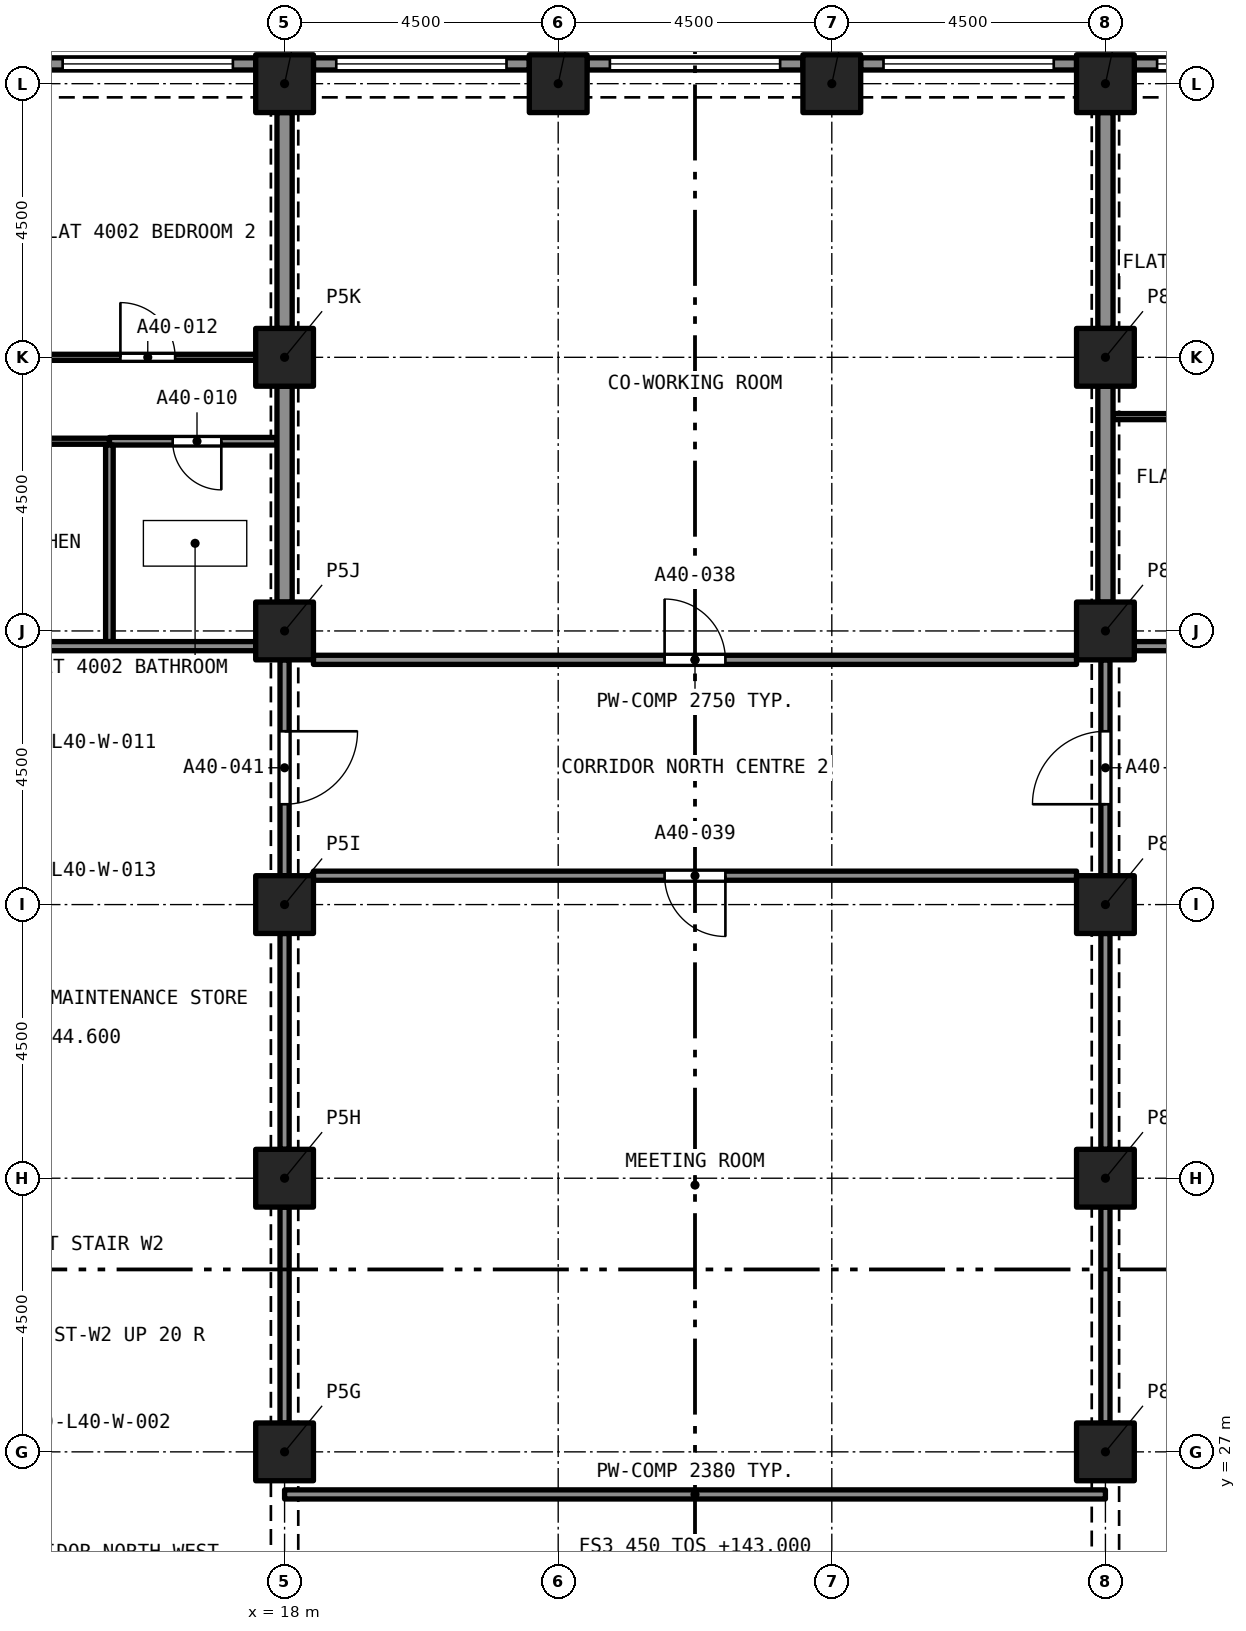
"""IFC4 building model, lengths in metres.
Left out: names, types, materials, properties, quantities, classifications, styles, units other than length and angle.
Written with IfcOpenShell. Run it as: python <this file> out.ifc"""

import sys

from ifc_helpers import new_model, si_unit, direction, frame, frame_2d, origin, origin_2d, place, context, subcontext, project, spatial, rectangle, extrude, element, fill, save


model = new_model("IFC4")
c1 = context("Model", 3, precision=1e-05, world=origin(), true_north=direction((0.0, 1.0)))
c2 = subcontext(c1, "Body", "Model", "MODEL_VIEW")
j1 = project(units=[si_unit("LENGTHUNIT", "METRE"), si_unit("PLANEANGLEUNIT", "RADIAN")], contexts=[c1])
p1 = place(None, origin())
s1 = spatial("IfcSite", under=j1, at=p1, CompositionType="ELEMENT")
p2 = place(p1, origin())
s2 = spatial("IfcBuilding", under=s1, at=p2, CompositionType="ELEMENT")
p3 = place(p2, frame((0.0, 0.0, 143.0)))
s3 = spatial("IfcBuildingStorey", under=s2, at=p3, CompositionType="ELEMENT", Elevation=143.0)
for number, where, z_axis, x_axis in (
    (1, (18.0, 27.0, 0.0), (0.0, 0.0, 1.0), (1.0, 0.0, 0.0)),
    (2, (31.5, 27.0, 0.0), (0.0, 0.0, 1.0), (1.0, 0.0, 0.0)),
    (3, (18.0, 31.5, 0.0), (0.0, 0.0, 1.0), (1.0, 0.0, 0.0)),
    (4, (31.5, 31.5, 0.0), (0.0, 0.0, 1.0), (1.0, 0.0, 0.0)),
    (5, (18.0, 36.0, 0.0), (0.0, 0.0, 1.0), (1.0, 0.0, 0.0)),
    (6, (31.5, 36.0, 0.0), (0.0, 0.0, 1.0), (1.0, 0.0, 0.0)),
    (7, (18.0, 40.5, 0.0), (0.0, 0.0, 1.0), (1.0, 0.0, 0.0)),
    (8, (31.5, 40.5, 0.0), (0.0, 0.0, 1.0), (1.0, 0.0, 0.0)),
    (9, (18.0, 45.0, 0.0), (0.0, 0.0, 1.0), (1.0, 0.0, 0.0)),
    (10, (31.5, 45.0, 0.0), (0.0, 0.0, 1.0), (1.0, 0.0, 0.0)),
    (11, (18.0, 49.5, 0.0), (0.0, 0.0, 1.0), (1.0, 0.0, 0.0)),
    (12, (22.5, 49.5, 0.0), (0.0, 0.0, 1.0), (1.0, 0.0, 0.0)),
    (13, (27.0, 49.5, 0.0), (0.0, 0.0, 1.0), (1.0, 0.0, 0.0)),
    (14, (31.5, 49.5, 0.0), (0.0, 0.0, 1.0), (1.0, 0.0, 0.0)),
):
    element("IfcColumn", number, at=place(p3, frame(where, z_axis=z_axis, x_axis=x_axis)), inside=s3, PredefinedType="COLUMN", context=c2, shape_type="SweptSolid", body=[
        extrude(rectangle(XDim=0.95, YDim=0.95, at=origin_2d()), origin(), (0.0, 0.0, 1.0), 3.2),
    ])
p4 = place(p3, frame((31.975, 49.825, 0.0), z_axis=(0.0, 0.0, 1.0), x_axis=(1.0, 0.0, 0.0)))
e15 = element("IfcWall", 15, at=p4, inside=s3, PredefinedType="SOLIDWALL", context=c2, shape_type="SweptSolid", body=[
    extrude(rectangle(XDim=3.55, YDim=0.2, at=frame_2d((1.775, 0.0))), origin(), (0.0, 0.0, 1.0), 3.2),
])
p5 = place(p4, frame((0.375, 0.0, 0.45)))
e16 = element("IfcOpeningElement", 16, at=p5, cuts=e15, PredefinedType="OPENING", context=c2, shape_type="SweptSolid", body=[
    extrude(rectangle(XDim=2.8, YDim=1.95, at=frame_2d((1.4, 0.975))), frame((0.0, 0.11, 0.0), z_axis=(0.0, -1.0, 0.0), x_axis=(1.0, 0.0, 0.0)), (0.0, 0.0, 1.0), 0.22),
])
p6 = place(p3, frame((27.475, 49.825, 0.0), z_axis=(0.0, 0.0, 1.0), x_axis=(1.0, 0.0, 0.0)))
e17 = element("IfcWall", 17, at=p6, inside=s3, PredefinedType="SOLIDWALL", context=c2, shape_type="SweptSolid", body=[
    extrude(rectangle(XDim=3.55, YDim=0.2, at=frame_2d((1.775, 0.0))), origin(), (0.0, 0.0, 1.0), 3.2),
])
p7 = place(p6, frame((0.375, 0.0, 0.45)))
e18 = element("IfcOpeningElement", 18, at=p7, cuts=e17, PredefinedType="OPENING", context=c2, shape_type="SweptSolid", body=[
    extrude(rectangle(XDim=2.8, YDim=1.95, at=frame_2d((1.4, 0.975))), frame((0.0, 0.11, 0.0), z_axis=(0.0, -1.0, 0.0), x_axis=(1.0, 0.0, 0.0)), (0.0, 0.0, 1.0), 0.22),
])
p8 = place(p3, frame((22.975, 49.825, 0.0), z_axis=(0.0, 0.0, 1.0), x_axis=(1.0, 0.0, 0.0)))
e19 = element("IfcWall", 19, at=p8, inside=s3, PredefinedType="SOLIDWALL", context=c2, shape_type="SweptSolid", body=[
    extrude(rectangle(XDim=3.55, YDim=0.2, at=frame_2d((1.775, 0.0))), origin(), (0.0, 0.0, 1.0), 3.2),
])
p9 = place(p8, frame((0.375, 0.0, 0.45)))
e20 = element("IfcOpeningElement", 20, at=p9, cuts=e19, PredefinedType="OPENING", context=c2, shape_type="SweptSolid", body=[
    extrude(rectangle(XDim=2.8, YDim=1.95, at=frame_2d((1.4, 0.975))), frame((0.0, 0.11, 0.0), z_axis=(0.0, -1.0, 0.0), x_axis=(1.0, 0.0, 0.0)), (0.0, 0.0, 1.0), 0.22),
])
p10 = place(p3, frame((18.475, 49.825, 0.0), z_axis=(0.0, 0.0, 1.0), x_axis=(1.0, 0.0, 0.0)))
e21 = element("IfcWall", 21, at=p10, inside=s3, PredefinedType="SOLIDWALL", context=c2, shape_type="SweptSolid", body=[
    extrude(rectangle(XDim=3.55, YDim=0.2, at=frame_2d((1.775, 0.0))), origin(), (0.0, 0.0, 1.0), 3.2),
])
p11 = place(p10, frame((0.375, 0.0, 0.45)))
e22 = element("IfcOpeningElement", 22, at=p11, cuts=e21, PredefinedType="OPENING", context=c2, shape_type="SweptSolid", body=[
    extrude(rectangle(XDim=2.8, YDim=1.95, at=frame_2d((1.4, 0.975))), frame((0.0, 0.11, 0.0), z_axis=(0.0, -1.0, 0.0), x_axis=(1.0, 0.0, 0.0)), (0.0, 0.0, 1.0), 0.22),
])
p12 = place(p3, frame((13.975, 49.825, 0.0), z_axis=(0.0, 0.0, 1.0), x_axis=(1.0, 0.0, 0.0)))
e23 = element("IfcWall", 23, at=p12, inside=s3, PredefinedType="SOLIDWALL", context=c2, shape_type="SweptSolid", body=[
    extrude(rectangle(XDim=3.55, YDim=0.2, at=frame_2d((1.775, 0.0))), origin(), (0.0, 0.0, 1.0), 3.2),
])
p13 = place(p12, frame((0.375, 0.0, 0.45)))
e24 = element("IfcOpeningElement", 24, at=p13, cuts=e23, PredefinedType="OPENING", context=c2, shape_type="SweptSolid", body=[
    extrude(rectangle(XDim=2.8, YDim=1.95, at=frame_2d((1.4, 0.975))), frame((0.0, 0.11, 0.0), z_axis=(0.0, -1.0, 0.0), x_axis=(1.0, 0.0, 0.0)), (0.0, 0.0, 1.0), 0.22),
])
p14 = place(p3, frame((17.875, 43.62, 0.0), z_axis=(0.0, 0.0, 1.0), x_axis=(-1.0, 0.0, 0.0)))
e25 = element("IfcWall", 25, at=p14, inside=s3, PredefinedType="PARTITIONING", context=c2, shape_type="SweptSolid", body=[
    extrude(rectangle(XDim=2.756, YDim=0.125, at=frame_2d((1.378, 0.0))), origin(), (0.0, 0.0, 1.0), 2.9),
])
p15 = place(p14, frame((0.915, 0.0, 0.0)))
e26 = element("IfcOpeningElement", 26, at=p15, cuts=e25, PredefinedType="OPENING", context=c2, shape_type="SweptSolid", body=[
    extrude(rectangle(XDim=0.8, YDim=2.1, at=frame_2d((0.4, 1.05))), frame((0.0, 0.073, 0.0), z_axis=(0.0, -1.0, 0.0), x_axis=(1.0, 0.0, 0.0)), (0.0, 0.0, 1.0), 0.145),
])
p16 = place(p3, frame((15.119, 40.325, 0.0), z_axis=(0.0, 0.0, 1.0), x_axis=(0.0, 1.0, 0.0)))
e27 = element("IfcWall", 27, at=p16, inside=s3, PredefinedType="PARTITIONING", context=c2, shape_type="SweptSolid", body=[
    extrude(rectangle(XDim=3.233, YDim=0.125, at=frame_2d((1.616, 0.0))), origin(), (0.0, 0.0, 1.0), 2.9),
])
p17 = place(p3, frame((18.0, 40.975, 0.0), z_axis=(0.0, 0.0, 1.0), x_axis=(0.0, 1.0, 0.0)))
e28 = element("IfcWall", 28, at=p17, inside=s3, PredefinedType="PARTITIONING", context=c2, shape_type="SweptSolid", body=[
    extrude(rectangle(XDim=3.55, YDim=0.25, at=frame_2d((1.775, 0.0))), origin(), (0.0, 0.0, 1.0), 2.38),
])
p18 = place(p3, frame((13.5, 45.0, 0.0), z_axis=(0.0, 0.0, 1.0), x_axis=(1.0, 0.0, 0.0)))
e29 = element("IfcWall", 29, at=p18, inside=s3, PredefinedType="PARTITIONING", context=c2, shape_type="SweptSolid", body=[
    extrude(rectangle(XDim=4.025, YDim=0.1, at=frame_2d((2.012, 0.0))), origin(), (0.0, 0.0, 1.0), 2.9),
])
p19 = place(p18, frame((1.8, 0.0, 0.0)))
e30 = element("IfcOpeningElement", 30, at=p19, cuts=e29, PredefinedType="OPENING", context=c2, shape_type="SweptSolid", body=[
    extrude(rectangle(XDim=0.9, YDim=2.1, at=frame_2d((0.45, 1.05))), frame((0.0, 0.06, 0.0), z_axis=(0.0, -1.0, 0.0), x_axis=(1.0, 0.0, 0.0)), (0.0, 0.0, 1.0), 0.12),
])
p20 = place(p3, frame((18.0, 45.475, 0.0), z_axis=(0.0, 0.0, 1.0), x_axis=(0.0, 1.0, 0.0)))
e31 = element("IfcWall", 31, at=p20, inside=s3, PredefinedType="PARTITIONING", context=c2, shape_type="SweptSolid", body=[
    extrude(rectangle(XDim=3.55, YDim=0.25, at=frame_2d((1.775, 0.0))), origin(), (0.0, 0.0, 1.0), 2.38),
])
p21 = place(p3, frame((15.119, 43.62, 0.0), z_axis=(0.0, 0.0, 1.0), x_axis=(-1.0, 0.0, 0.0)))
e32 = element("IfcWall", 32, at=p21, inside=s3, PredefinedType="PARTITIONING", context=c2, shape_type="SweptSolid", body=[
    extrude(rectangle(XDim=4.219, YDim=0.1, at=frame_2d((2.11, 0.0))), origin(), (0.0, 0.0, 1.0), 2.9),
])
p22 = place(p21, frame((1.635, 0.0, 0.0)))
e33 = element("IfcOpeningElement", 33, at=p22, cuts=e32, PredefinedType="OPENING", context=c2, shape_type="SweptSolid", body=[
    extrude(rectangle(XDim=0.9, YDim=2.1, at=frame_2d((0.45, 1.05))), frame((0.0, 0.06, 0.0), z_axis=(0.0, -1.0, 0.0), x_axis=(1.0, 0.0, 0.0)), (0.0, 0.0, 1.0), 0.12),
])
p23 = place(p3, frame((13.25, 40.25, 0.0), z_axis=(0.0, 0.0, 1.0), x_axis=(1.0, 0.0, 0.0)))
e34 = element("IfcWall", 34, at=p23, inside=s3, PredefinedType="PARTITIONING", context=c2, shape_type="SweptSolid", body=[
    extrude(rectangle(XDim=4.275, YDim=0.15, at=frame_2d((2.137, 0.0))), origin(), (0.0, 0.0, 1.0), 2.9),
])
p24 = place(p3, frame((31.625, 44.025, 0.0), z_axis=(0.0, 0.0, 1.0), x_axis=(1.0, 0.0, 0.0)))
e35 = element("IfcWall", 35, at=p24, inside=s3, PredefinedType="PARTITIONING", context=c2, shape_type="SweptSolid", body=[
    extrude(rectangle(XDim=4.375, YDim=0.1, at=frame_2d((2.188, 0.0))), origin(), (0.0, 0.0, 1.0), 2.9),
])
p25 = place(p24, frame((1.625, 0.0, 0.0)))
e36 = element("IfcOpeningElement", 36, at=p25, cuts=e35, PredefinedType="OPENING", context=c2, shape_type="SweptSolid", body=[
    extrude(rectangle(XDim=1.0, YDim=2.1, at=frame_2d((0.5, 1.05))), frame((0.0, 0.06, 0.0), z_axis=(0.0, -1.0, 0.0), x_axis=(1.0, 0.0, 0.0)), (0.0, 0.0, 1.0), 0.12),
])
p26 = place(p3, frame((31.5, 40.975, 0.0), z_axis=(0.0, 0.0, 1.0), x_axis=(0.0, 1.0, 0.0)))
e37 = element("IfcWall", 37, at=p26, inside=s3, PredefinedType="PARTITIONING", context=c2, shape_type="SweptSolid", body=[
    extrude(rectangle(XDim=3.55, YDim=0.25, at=frame_2d((1.775, 0.0))), origin(), (0.0, 0.0, 1.0), 2.38),
])
p27 = place(p3, frame((31.975, 40.25, 0.0), z_axis=(0.0, 0.0, 1.0), x_axis=(1.0, 0.0, 0.0)))
e38 = element("IfcWall", 38, at=p27, inside=s3, PredefinedType="PARTITIONING", context=c2, shape_type="SweptSolid", body=[
    extrude(rectangle(XDim=2.375, YDim=0.15, at=frame_2d((1.188, 0.0))), origin(), (0.0, 0.0, 1.0), 2.9),
])
p28 = place(p27, frame((1.245, 0.0, 0.0)))
e39 = element("IfcOpeningElement", 39, at=p28, cuts=e38, PredefinedType="OPENING", context=c2, shape_type="SweptSolid", body=[
    extrude(rectangle(XDim=1.0, YDim=2.1, at=frame_2d((0.5, 1.05))), frame((0.0, 0.085, 0.0), z_axis=(0.0, -1.0, 0.0), x_axis=(1.0, 0.0, 0.0)), (0.0, 0.0, 1.0), 0.17),
])
p29 = place(p3, frame((31.5, 45.475, 0.0), z_axis=(0.0, 0.0, 1.0), x_axis=(0.0, 1.0, 0.0)))
e40 = element("IfcWall", 40, at=p29, inside=s3, PredefinedType="PARTITIONING", context=c2, shape_type="SweptSolid", body=[
    extrude(rectangle(XDim=3.55, YDim=0.25, at=frame_2d((1.775, 0.0))), origin(), (0.0, 0.0, 1.0), 2.38),
])
p30 = place(p3, frame((18.475, 40.025, 0.0), z_axis=(0.0, 0.0, 1.0), x_axis=(1.0, 0.0, 0.0)))
e41 = element("IfcWall", 41, at=p30, inside=s3, PredefinedType="PARTITIONING", context=c2, shape_type="SweptSolid", body=[
    extrude(rectangle(XDim=12.55, YDim=0.15, at=frame_2d((6.275, 0.0))), origin(), (0.0, 0.0, 1.0), 2.75),
])
p31 = place(p30, frame((5.775, 0.0, 0.0)))
e42 = element("IfcOpeningElement", 42, at=p31, cuts=e41, PredefinedType="OPENING", context=c2, shape_type="SweptSolid", body=[
    extrude(rectangle(XDim=1.0, YDim=2.1, at=frame_2d((0.5, 1.05))), frame((0.0, 0.085, 0.0), z_axis=(0.0, -1.0, 0.0), x_axis=(1.0, 0.0, 0.0)), (0.0, 0.0, 1.0), 0.17),
])
p32 = place(p3, frame((31.025, 36.475, 0.0), z_axis=(0.0, 0.0, 1.0), x_axis=(-1.0, 0.0, 0.0)))
e43 = element("IfcWall", 43, at=p32, inside=s3, PredefinedType="PARTITIONING", context=c2, shape_type="SweptSolid", body=[
    extrude(rectangle(XDim=12.55, YDim=0.15, at=frame_2d((6.275, 0.0))), origin(), (0.0, 0.0, 1.0), 2.75),
])
p33 = place(p32, frame((5.775, 0.0, 0.0)))
e44 = element("IfcOpeningElement", 44, at=p33, cuts=e43, PredefinedType="OPENING", context=c2, shape_type="SweptSolid", body=[
    extrude(rectangle(XDim=1.0, YDim=2.1, at=frame_2d((0.5, 1.05))), frame((0.0, 0.085, 0.0), z_axis=(0.0, -1.0, 0.0), x_axis=(1.0, 0.0, 0.0)), (0.0, 0.0, 1.0), 0.17),
])
p34 = place(p3, frame((31.5, 36.475, 0.0), z_axis=(0.0, 0.0, 1.0), x_axis=(0.0, 1.0, 0.0)))
e45 = element("IfcWall", 45, at=p34, inside=s3, PredefinedType="PARTITIONING", context=c2, shape_type="SweptSolid", body=[
    extrude(rectangle(XDim=3.55, YDim=0.15, at=frame_2d((1.775, 0.0))), origin(), (0.0, 0.0, 1.0), 2.38),
])
p35 = place(p34, frame((1.175, 0.0, 0.0)))
e46 = element("IfcOpeningElement", 46, at=p35, cuts=e45, PredefinedType="OPENING", context=c2, shape_type="SweptSolid", body=[
    extrude(rectangle(XDim=1.2, YDim=2.1, at=frame_2d((0.6, 1.05))), frame((0.0, 0.085, 0.0), z_axis=(0.0, -1.0, 0.0), x_axis=(1.0, 0.0, 0.0)), (0.0, 0.0, 1.0), 0.17),
])
p36 = place(p3, frame((18.0, 40.025, 0.0), z_axis=(0.0, 0.0, 1.0), x_axis=(0.0, -1.0, 0.0)))
e47 = element("IfcWall", 47, at=p36, inside=s3, PredefinedType="PARTITIONING", context=c2, shape_type="SweptSolid", body=[
    extrude(rectangle(XDim=3.55, YDim=0.15, at=frame_2d((1.775, 0.0))), origin(), (0.0, 0.0, 1.0), 2.38),
])
p37 = place(p36, frame((1.175, 0.0, 0.0)))
e48 = element("IfcOpeningElement", 48, at=p37, cuts=e47, PredefinedType="OPENING", context=c2, shape_type="SweptSolid", body=[
    extrude(rectangle(XDim=1.2, YDim=2.1, at=frame_2d((0.6, 1.05))), frame((0.0, 0.085, 0.0), z_axis=(0.0, -1.0, 0.0), x_axis=(1.0, 0.0, 0.0)), (0.0, 0.0, 1.0), 0.17),
])
for number, where, z_axis, x_axis in (
    (49, (31.5, 31.975, 0.0), (0.0, 0.0, 1.0), (0.0, 1.0, 0.0)),
    (50, (31.5, 27.475, 0.0), (0.0, 0.0, 1.0), (0.0, 1.0, 0.0)),
    (51, (18.0, 27.475, 0.0), (0.0, 0.0, 1.0), (0.0, 1.0, 0.0)),
    (52, (18.0, 31.975, 0.0), (0.0, 0.0, 1.0), (0.0, 1.0, 0.0)),
):
    element("IfcWall", number, at=place(p3, frame(where, z_axis=z_axis, x_axis=x_axis)), inside=s3, PredefinedType="PARTITIONING", context=c2, shape_type="SweptSolid", body=[
        extrude(rectangle(XDim=3.55, YDim=0.15, at=frame_2d((1.775, 0.0))), origin(), (0.0, 0.0, 1.0), 2.38),
    ])
p38 = place(p3, frame((18.0, 26.3, 0.0), z_axis=(0.0, 0.0, 1.0), x_axis=(1.0, 0.0, 0.0)))
e53 = element("IfcWall", 53, at=p38, inside=s3, PredefinedType="PARTITIONING", context=c2, shape_type="SweptSolid", body=[
    extrude(rectangle(XDim=13.5, YDim=0.15, at=frame_2d((6.75, 0.0))), origin(), (0.0, 0.0, 1.0), 2.38),
])
p39 = place(p5, origin())
e54 = element("IfcWindow", 54, at=p39, inside=s3, PartitioningType="SINGLE_PANEL", PredefinedType="WINDOW", context=c2, shape_type="SweptSolid", body=[
    extrude(rectangle(XDim=2.8, YDim=1.95, at=frame_2d((1.4, 0.975))), frame((0.0, 0.03, 0.0), z_axis=(0.0, -1.0, 0.0), x_axis=(1.0, 0.0, 0.0)), (0.0, 0.0, 1.0), 0.06),
])
fill(e16, e54)
p40 = place(p7, origin())
e55 = element("IfcWindow", 55, at=p40, inside=s3, PartitioningType="SINGLE_PANEL", PredefinedType="WINDOW", context=c2, shape_type="SweptSolid", body=[
    extrude(rectangle(XDim=2.8, YDim=1.95, at=frame_2d((1.4, 0.975))), frame((0.0, 0.03, 0.0), z_axis=(0.0, -1.0, 0.0), x_axis=(1.0, 0.0, 0.0)), (0.0, 0.0, 1.0), 0.06),
])
fill(e18, e55)
p41 = place(p9, origin())
e56 = element("IfcWindow", 56, at=p41, inside=s3, PartitioningType="SINGLE_PANEL", PredefinedType="WINDOW", context=c2, shape_type="SweptSolid", body=[
    extrude(rectangle(XDim=2.8, YDim=1.95, at=frame_2d((1.4, 0.975))), frame((0.0, 0.03, 0.0), z_axis=(0.0, -1.0, 0.0), x_axis=(1.0, 0.0, 0.0)), (0.0, 0.0, 1.0), 0.06),
])
fill(e20, e56)
p42 = place(p11, origin())
e57 = element("IfcWindow", 57, at=p42, inside=s3, PartitioningType="SINGLE_PANEL", PredefinedType="WINDOW", context=c2, shape_type="SweptSolid", body=[
    extrude(rectangle(XDim=2.8, YDim=1.95, at=frame_2d((1.4, 0.975))), frame((0.0, 0.03, 0.0), z_axis=(0.0, -1.0, 0.0), x_axis=(1.0, 0.0, 0.0)), (0.0, 0.0, 1.0), 0.06),
])
fill(e22, e57)
p43 = place(p13, origin())
e58 = element("IfcWindow", 58, at=p43, inside=s3, PartitioningType="SINGLE_PANEL", PredefinedType="WINDOW", context=c2, shape_type="SweptSolid", body=[
    extrude(rectangle(XDim=2.8, YDim=1.95, at=frame_2d((1.4, 0.975))), frame((0.0, 0.03, 0.0), z_axis=(0.0, -1.0, 0.0), x_axis=(1.0, 0.0, 0.0)), (0.0, 0.0, 1.0), 0.06),
])
fill(e24, e58)
p44 = place(p15, origin())
e59 = element("IfcDoor", 59, at=p44, inside=s3, OperationType="SINGLE_SWING_LEFT", PredefinedType="DOOR", context=c2, shape_type="SweptSolid", body=[
    extrude(rectangle(XDim=0.8, YDim=2.1, at=frame_2d((0.4, 1.05))), frame((0.0, 0.025, 0.0), z_axis=(0.0, -1.0, 0.0), x_axis=(1.0, 0.0, 0.0)), (0.0, 0.0, 1.0), 0.05),
])
fill(e26, e59)
p45 = place(p19, origin())
e60 = element("IfcDoor", 60, at=p45, inside=s3, OperationType="SINGLE_SWING_RIGHT", PredefinedType="DOOR", context=c2, shape_type="SweptSolid", body=[
    extrude(rectangle(XDim=0.9, YDim=2.1, at=frame_2d((0.45, 1.05))), frame((0.0, 0.025, 0.0), z_axis=(0.0, -1.0, 0.0), x_axis=(1.0, 0.0, 0.0)), (0.0, 0.0, 1.0), 0.05),
])
fill(e30, e60)
p46 = place(p31, origin())
e61 = element("IfcDoor", 61, at=p46, inside=s3, OperationType="SINGLE_SWING_RIGHT", PredefinedType="DOOR", context=c2, shape_type="SweptSolid", body=[
    extrude(rectangle(XDim=1.0, YDim=2.1, at=frame_2d((0.5, 1.05))), frame((0.0, 0.025, 0.0), z_axis=(0.0, -1.0, 0.0), x_axis=(1.0, 0.0, 0.0)), (0.0, 0.0, 1.0), 0.05),
])
fill(e42, e61)
p47 = place(p33, origin())
e62 = element("IfcDoor", 62, at=p47, inside=s3, OperationType="SINGLE_SWING_RIGHT", PredefinedType="DOOR", context=c2, shape_type="SweptSolid", body=[
    extrude(rectangle(XDim=1.0, YDim=2.1, at=frame_2d((0.5, 1.05))), frame((0.0, 0.025, 0.0), z_axis=(0.0, -1.0, 0.0), x_axis=(1.0, 0.0, 0.0)), (0.0, 0.0, 1.0), 0.05),
])
fill(e44, e62)
p48 = place(p35, origin())
e63 = element("IfcDoor", 63, at=p48, inside=s3, OperationType="SINGLE_SWING_LEFT", PredefinedType="DOOR", context=c2, shape_type="SweptSolid", body=[
    extrude(rectangle(XDim=1.2, YDim=2.1, at=frame_2d((0.6, 1.05))), frame((0.0, 0.025, 0.0), z_axis=(0.0, -1.0, 0.0), x_axis=(1.0, 0.0, 0.0)), (0.0, 0.0, 1.0), 0.05),
])
fill(e46, e63)
p49 = place(p37, origin())
e64 = element("IfcDoor", 64, at=p49, inside=s3, OperationType="SINGLE_SWING_LEFT", PredefinedType="DOOR", context=c2, shape_type="SweptSolid", body=[
    extrude(rectangle(XDim=1.2, YDim=2.1, at=frame_2d((0.6, 1.05))), frame((0.0, 0.025, 0.0), z_axis=(0.0, -1.0, 0.0), x_axis=(1.0, 0.0, 0.0)), (0.0, 0.0, 1.0), 0.05),
])
fill(e48, e64)
save(model, sys.argv[1])
